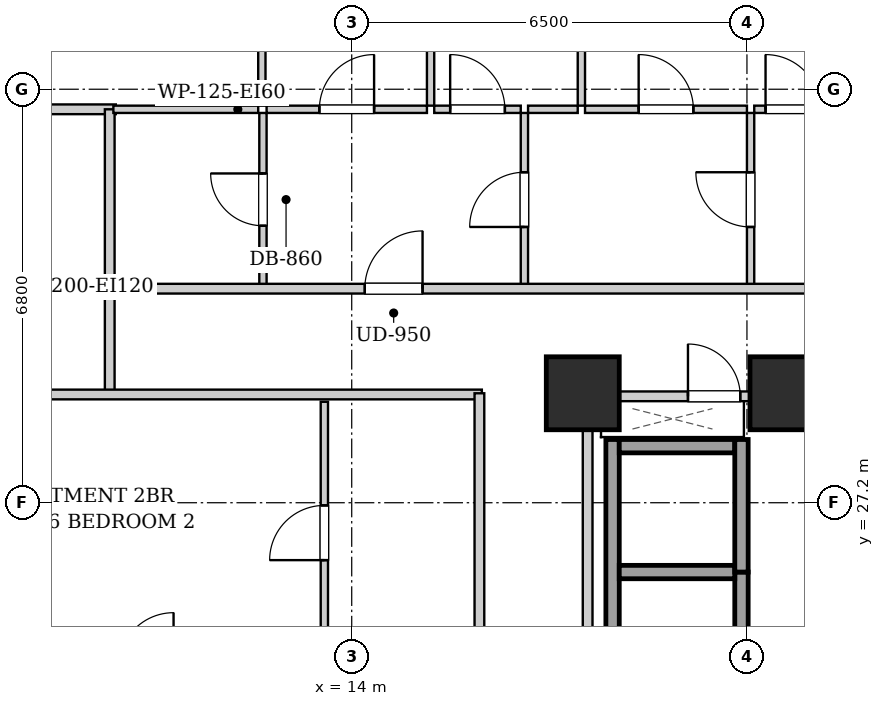
"""IFC4 building model, lengths in metres.
Left out: names, types, materials, properties, quantities, classifications, styles, units other than length and angle.
Written with IfcOpenShell. Run it as: python <this file> out.ifc"""

import sys

from ifc_helpers import new_model, si_unit, direction, frame, frame_2d, origin, origin_2d, place, context, subcontext, project, spatial, rectangle, extrude, element, fill, save


model = new_model("IFC4")
c1 = context("Model", 3, precision=1e-05, world=origin(), true_north=direction((0.0, 1.0)))
c2 = subcontext(c1, "Body", "Model", "MODEL_VIEW")
j1 = project(units=[si_unit("LENGTHUNIT", "METRE"), si_unit("PLANEANGLEUNIT", "RADIAN")], contexts=[c1])
p1 = place(None, origin())
s1 = spatial("IfcSite", under=j1, at=p1, CompositionType="ELEMENT")
p2 = place(p1, origin())
s2 = spatial("IfcBuilding", under=s1, at=p2, CompositionType="ELEMENT")
p3 = place(p2, frame((0.0, 0.0, 48.2)))
s3 = spatial("IfcBuildingStorey", under=s2, at=p3, CompositionType="ELEMENT", Elevation=48.2)
for number, where, z_axis, x_axis in (
    (1, (17.8, 29.0, 0.0), (0.0, 0.0, 1.0), (1.0, 0.0, 0.0)),
    (2, (21.15, 29.0, 0.0), (0.0, 0.0, 1.0), (1.0, 0.0, 0.0)),
):
    element("IfcColumn", number, at=place(p3, frame(where, z_axis=z_axis, x_axis=x_axis)), inside=s3, PredefinedType="COLUMN", context=c2, shape_type="SweptSolid", body=[
        extrude(rectangle(XDim=1.2, YDim=1.2, at=origin_2d()), origin(), (0.0, 0.0, 1.0), 3.2),
    ])
p4 = place(p3, frame((18.29, 24.1, 0.0), z_axis=(0.0, 0.0, 1.0), x_axis=(0.0, 1.0, 0.0)))
e3 = element("IfcWall", 3, at=p4, inside=s3, PredefinedType="SHEAR", context=c2, shape_type="SweptSolid", body=[
    extrude(rectangle(XDim=4.14, YDim=0.22, at=frame_2d((2.07, 0.0))), origin(), (0.0, 0.0, 1.0), 2.94),
])
p5 = place(p3, frame((20.41, 24.1, 0.0), z_axis=(0.0, 0.0, 1.0), x_axis=(0.0, 1.0, 0.0)))
e4 = element("IfcWall", 4, at=p5, inside=s3, PredefinedType="SHEAR", context=c2, shape_type="SweptSolid", body=[
    extrude(rectangle(XDim=1.96, YDim=0.22, at=frame_2d((0.98, 0.0))), origin(), (0.0, 0.0, 1.0), 2.94),
])
for number, where, z_axis, x_axis in (
    (5, (18.4, 26.06, 0.0), (0.0, 0.0, 1.0), (1.0, 0.0, 0.0)),
    (6, (18.4, 28.13, 0.0), (0.0, 0.0, 1.0), (1.0, 0.0, 0.0)),
):
    element("IfcWall", number, at=place(p3, frame(where, z_axis=z_axis, x_axis=x_axis)), inside=s3, PredefinedType="SHEAR", context=c2, shape_type="SweptSolid", body=[
        extrude(rectangle(XDim=1.9, YDim=0.22, at=frame_2d((0.95, 0.0))), origin(), (0.0, 0.0, 1.0), 2.94),
    ])
p6 = place(p3, frame((20.41, 26.06, 0.0), z_axis=(0.0, 0.0, 1.0), x_axis=(0.0, 1.0, 0.0)))
e7 = element("IfcWall", 7, at=p6, inside=s3, PredefinedType="SHEAR", context=c2, shape_type="SweptSolid", body=[
    extrude(rectangle(XDim=2.18, YDim=0.22, at=frame_2d((1.09, 0.0))), origin(), (0.0, 0.0, 1.0), 2.94),
])
p7 = place(p3, frame((17.88, 24.12, 0.0), z_axis=(0.0, 0.0, 1.0), x_axis=(0.0, 1.0, 0.0)))
e8 = element("IfcWall", 8, at=p7, inside=s3, PredefinedType="PARTITIONING", context=c2, shape_type="SweptSolid", body=[
    extrude(rectangle(XDim=4.76, YDim=0.16, at=frame_2d((2.38, 0.0))), origin(), (0.0, 0.0, 1.0), 2.275),
])
p8 = place(p3, frame((17.96, 28.95, 0.0), z_axis=(0.0, 0.0, 1.0), x_axis=(1.0, 0.0, 0.0)))
e9 = element("IfcWall", 9, at=p8, inside=s3, PredefinedType="PARTITIONING", context=c2, shape_type="SweptSolid", body=[
    extrude(rectangle(XDim=4.29, YDim=0.16, at=frame_2d((2.145, 0.0))), origin(), (0.0, 0.0, 1.0), 2.232),
])
p9 = place(p8, frame((1.57, 0.0, 0.0)))
e10 = element("IfcOpeningElement", 10, at=p9, cuts=e9, PredefinedType="OPENING", context=c2, shape_type="SweptSolid", body=[
    extrude(rectangle(XDim=0.86, YDim=2.05, at=frame_2d((0.43, 1.025))), frame((0.0, 0.09, 0.0), z_axis=(0.0, -1.0, 0.0), x_axis=(1.0, 0.0, 0.0)), (0.0, 0.0, 1.0), 0.18),
])
p10 = place(p3, frame((10.02, 28.98, 0.0), z_axis=(0.0, 0.0, 1.0), x_axis=(0.0, 1.0, 0.0)))
e11 = element("IfcWall", 11, at=p10, inside=s3, PredefinedType="PARTITIONING", context=c2, shape_type="SweptSolid", body=[
    extrude(rectangle(XDim=1.74, YDim=0.16, at=frame_2d((0.87, 0.0))), origin(), (0.0, 0.0, 1.0), 2.94),
])
p11 = place(p3, frame((7.78, 28.98, 0.0), z_axis=(0.0, 0.0, 1.0), x_axis=(1.0, 0.0, 0.0)))
e12 = element("IfcWall", 12, at=p11, inside=s3, PredefinedType="PARTITIONING", context=c2, shape_type="SweptSolid", body=[
    extrude(rectangle(XDim=8.36, YDim=0.16, at=frame_2d((4.18, 0.0))), origin(), (0.0, 0.0, 1.0), 2.232),
])
p12 = place(p3, frame((7.78, 33.67, 0.0), z_axis=(0.0, 0.0, 1.0), x_axis=(1.0, 0.0, 0.0)))
e13 = element("IfcWall", 13, at=p12, inside=s3, PredefinedType="PARTITIONING", context=c2, shape_type="SweptSolid", body=[
    extrude(rectangle(XDim=2.34, YDim=0.16, at=frame_2d((1.17, 0.0))), origin(), (0.0, 0.0, 1.0), 2.94),
])
p13 = place(p3, frame((10.02, 30.76, 0.0), z_axis=(0.0, 0.0, 1.0), x_axis=(0.0, 1.0, 0.0)))
e14 = element("IfcWall", 14, at=p13, inside=s3, PredefinedType="PARTITIONING", context=c2, shape_type="SweptSolid", body=[
    extrude(rectangle(XDim=2.91, YDim=0.16, at=frame_2d((1.455, 0.0))), origin(), (0.0, 0.0, 1.0), 2.94),
])
p14 = place(p3, frame((12.54, 30.76, 0.0), z_axis=(0.0, 0.0, 1.0), x_axis=(0.0, 1.0, 0.0)))
e15 = element("IfcWall", 15, at=p14, inside=s3, PredefinedType="PARTITIONING", context=c2, shape_type="SweptSolid", body=[
    extrude(rectangle(XDim=2.85, YDim=0.12, at=frame_2d((1.425, 0.0))), origin(), (0.0, 0.0, 1.0), 2.94),
])
p15 = place(p14, frame((0.995, 0.0, 0.0)))
e16 = element("IfcOpeningElement", 16, at=p15, cuts=e15, PredefinedType="OPENING", context=c2, shape_type="SweptSolid", body=[
    extrude(rectangle(XDim=0.86, YDim=2.05, at=frame_2d((0.43, 1.025))), frame((0.0, 0.07, 0.0), z_axis=(0.0, -1.0, 0.0), x_axis=(1.0, 0.0, 0.0)), (0.0, 0.0, 1.0), 0.14),
])
p16 = place(p3, frame((10.08, 33.67, 0.0), z_axis=(0.0, 0.0, 1.0), x_axis=(1.0, 0.0, 0.0)))
e17 = element("IfcWall", 17, at=p16, inside=s3, PredefinedType="PARTITIONING", context=c2, shape_type="SweptSolid", body=[
    extrude(rectangle(XDim=2.382, YDim=0.12, at=frame_2d((1.191, 0.0))), origin(), (0.0, 0.0, 1.0), 2.94),
])
p17 = place(p3, frame((16.84, 30.76, 0.0), z_axis=(0.0, 0.0, 1.0), x_axis=(0.0, 1.0, 0.0)))
e18 = element("IfcWall", 18, at=p17, inside=s3, PredefinedType="PARTITIONING", context=c2, shape_type="SweptSolid", body=[
    extrude(rectangle(XDim=2.85, YDim=0.12, at=frame_2d((1.425, 0.0))), origin(), (0.0, 0.0, 1.0), 2.94),
])
p18 = place(p17, frame((0.975, 0.0, 0.0)))
e19 = element("IfcOpeningElement", 19, at=p18, cuts=e18, PredefinedType="OPENING", context=c2, shape_type="SweptSolid", body=[
    extrude(rectangle(XDim=0.9, YDim=2.05, at=frame_2d((0.45, 1.025))), frame((0.0, 0.07, 0.0), z_axis=(0.0, -1.0, 0.0), x_axis=(1.0, 0.0, 0.0)), (0.0, 0.0, 1.0), 0.14),
])
p19 = place(p3, frame((12.6, 33.67, 0.0), z_axis=(0.0, 0.0, 1.0), x_axis=(1.0, 0.0, 0.0)))
e20 = element("IfcWall", 20, at=p19, inside=s3, PredefinedType="PARTITIONING", context=c2, shape_type="SweptSolid", body=[
    extrude(rectangle(XDim=2.637, YDim=0.12, at=frame_2d((1.318, 0.0))), origin(), (0.0, 0.0, 1.0), 2.94),
])
p20 = place(p19, frame((0.868, 0.0, 0.0)))
e21 = element("IfcOpeningElement", 21, at=p20, cuts=e20, PredefinedType="OPENING", context=c2, shape_type="SweptSolid", body=[
    extrude(rectangle(XDim=0.9, YDim=2.05, at=frame_2d((0.45, 1.025))), frame((0.0, 0.07, 0.0), z_axis=(0.0, -1.0, 0.0), x_axis=(1.0, 0.0, 0.0)), (0.0, 0.0, 1.0), 0.14),
])
p21 = place(p3, frame((15.357, 33.67, 0.0), z_axis=(0.0, 0.0, 1.0), x_axis=(1.0, 0.0, 0.0)))
e22 = element("IfcWall", 22, at=p21, inside=s3, PredefinedType="PARTITIONING", context=c2, shape_type="SweptSolid", body=[
    extrude(rectangle(XDim=1.423, YDim=0.12, at=frame_2d((0.711, 0.0))), origin(), (0.0, 0.0, 1.0), 2.94),
])
p22 = place(p21, frame((0.262, 0.0, 0.0)))
e23 = element("IfcOpeningElement", 23, at=p22, cuts=e22, PredefinedType="OPENING", context=c2, shape_type="SweptSolid", body=[
    extrude(rectangle(XDim=0.9, YDim=2.05, at=frame_2d((0.45, 1.025))), frame((0.0, 0.07, 0.0), z_axis=(0.0, -1.0, 0.0), x_axis=(1.0, 0.0, 0.0)), (0.0, 0.0, 1.0), 0.14),
])
p23 = place(p3, frame((20.56, 30.76, 0.0), z_axis=(0.0, 0.0, 1.0), x_axis=(0.0, 1.0, 0.0)))
e24 = element("IfcWall", 24, at=p23, inside=s3, PredefinedType="PARTITIONING", context=c2, shape_type="SweptSolid", body=[
    extrude(rectangle(XDim=2.85, YDim=0.12, at=frame_2d((1.425, 0.0))), origin(), (0.0, 0.0, 1.0), 2.94),
])
p24 = place(p23, frame((0.975, 0.0, 0.0)))
e25 = element("IfcOpeningElement", 25, at=p24, cuts=e24, PredefinedType="OPENING", context=c2, shape_type="SweptSolid", body=[
    extrude(rectangle(XDim=0.9, YDim=2.05, at=frame_2d((0.45, 1.025))), frame((0.0, 0.07, 0.0), z_axis=(0.0, -1.0, 0.0), x_axis=(1.0, 0.0, 0.0)), (0.0, 0.0, 1.0), 0.14),
])
p25 = place(p3, frame((16.9, 33.67, 0.0), z_axis=(0.0, 0.0, 1.0), x_axis=(1.0, 0.0, 0.0)))
e26 = element("IfcWall", 26, at=p25, inside=s3, PredefinedType="PARTITIONING", context=c2, shape_type="SweptSolid", body=[
    extrude(rectangle(XDim=0.817, YDim=0.12, at=frame_2d((0.409, 0.0))), origin(), (0.0, 0.0, 1.0), 2.94),
])
p26 = place(p3, frame((17.837, 33.67, 0.0), z_axis=(0.0, 0.0, 1.0), x_axis=(1.0, 0.0, 0.0)))
e27 = element("IfcWall", 27, at=p26, inside=s3, PredefinedType="PARTITIONING", context=c2, shape_type="SweptSolid", body=[
    extrude(rectangle(XDim=2.663, YDim=0.12, at=frame_2d((1.332, 0.0))), origin(), (0.0, 0.0, 1.0), 2.94),
])
p27 = place(p26, frame((0.882, 0.0, 0.0)))
e28 = element("IfcOpeningElement", 28, at=p27, cuts=e27, PredefinedType="OPENING", context=c2, shape_type="SweptSolid", body=[
    extrude(rectangle(XDim=0.9, YDim=2.05, at=frame_2d((0.45, 1.025))), frame((0.0, 0.07, 0.0), z_axis=(0.0, -1.0, 0.0), x_axis=(1.0, 0.0, 0.0)), (0.0, 0.0, 1.0), 0.14),
])
p28 = place(p3, frame((20.62, 33.67, 0.0), z_axis=(0.0, 0.0, 1.0), x_axis=(1.0, 0.0, 0.0)))
e29 = element("IfcWall", 29, at=p28, inside=s3, PredefinedType="PARTITIONING", context=c2, shape_type="SweptSolid", body=[
    extrude(rectangle(XDim=1.273, YDim=0.12, at=frame_2d((0.636, 0.0))), origin(), (0.0, 0.0, 1.0), 2.94),
])
p29 = place(p28, frame((0.186, 0.0, 0.0)))
e30 = element("IfcOpeningElement", 30, at=p29, cuts=e29, PredefinedType="OPENING", context=c2, shape_type="SweptSolid", body=[
    extrude(rectangle(XDim=0.9, YDim=2.05, at=frame_2d((0.45, 1.025))), frame((0.0, 0.07, 0.0), z_axis=(0.0, -1.0, 0.0), x_axis=(1.0, 0.0, 0.0)), (0.0, 0.0, 1.0), 0.14),
])
p30 = place(p3, frame((12.522, 33.73, 0.0), z_axis=(0.0, 0.0, 1.0), x_axis=(0.0, 1.0, 0.0)))
e31 = element("IfcWall", 31, at=p30, inside=s3, PredefinedType="PARTITIONING", context=c2, shape_type="SweptSolid", body=[
    extrude(rectangle(XDim=13.59, YDim=0.12, at=frame_2d((6.795, 0.0))), origin(), (0.0, 0.0, 1.0), 2.94),
])
p31 = place(p30, frame((6.33, 0.0, 0.0)))
e32 = element("IfcOpeningElement", 32, at=p31, cuts=e31, PredefinedType="OPENING", context=c2, shape_type="SweptSolid", body=[
    extrude(rectangle(XDim=0.9, YDim=2.05, at=frame_2d((0.45, 1.025))), frame((0.0, 0.07, 0.0), z_axis=(0.0, -1.0, 0.0), x_axis=(1.0, 0.0, 0.0)), (0.0, 0.0, 1.0), 0.14),
])
p32 = place(p3, frame((15.297, 33.73, 0.0), z_axis=(0.0, 0.0, 1.0), x_axis=(0.0, 1.0, 0.0)))
e33 = element("IfcWall", 33, at=p32, inside=s3, PredefinedType="PARTITIONING", context=c2, shape_type="SweptSolid", body=[
    extrude(rectangle(XDim=13.59, YDim=0.12, at=frame_2d((6.795, 0.0))), origin(), (0.0, 0.0, 1.0), 2.94),
])
p33 = place(p32, frame((6.33, 0.0, 0.0)))
e34 = element("IfcOpeningElement", 34, at=p33, cuts=e33, PredefinedType="OPENING", context=c2, shape_type="SweptSolid", body=[
    extrude(rectangle(XDim=0.9, YDim=2.05, at=frame_2d((0.45, 1.025))), frame((0.0, 0.07, 0.0), z_axis=(0.0, -1.0, 0.0), x_axis=(1.0, 0.0, 0.0)), (0.0, 0.0, 1.0), 0.14),
])
p34 = place(p3, frame((17.777, 33.73, 0.0), z_axis=(0.0, 0.0, 1.0), x_axis=(0.0, 1.0, 0.0)))
e35 = element("IfcWall", 35, at=p34, inside=s3, PredefinedType="PARTITIONING", context=c2, shape_type="SweptSolid", body=[
    extrude(rectangle(XDim=13.59, YDim=0.12, at=frame_2d((6.795, 0.0))), origin(), (0.0, 0.0, 1.0), 2.232),
])
p35 = place(p34, frame((6.33, 0.0, 0.0)))
e36 = element("IfcOpeningElement", 36, at=p35, cuts=e35, PredefinedType="OPENING", context=c2, shape_type="SweptSolid", body=[
    extrude(rectangle(XDim=0.9, YDim=2.05, at=frame_2d((0.45, 1.025))), frame((0.0, 0.07, 0.0), z_axis=(0.0, -1.0, 0.0), x_axis=(1.0, 0.0, 0.0)), (0.0, 0.0, 1.0), 0.14),
])
p36 = place(p3, frame((13.55, 24.552, 0.0), z_axis=(0.0, 0.0, 1.0), x_axis=(0.0, 1.0, 0.0)))
e37 = element("IfcWall", 37, at=p36, inside=s3, PredefinedType="PARTITIONING", context=c2, shape_type="SweptSolid", body=[
    extrude(rectangle(XDim=4.308, YDim=0.12, at=frame_2d((2.154, 0.0))), origin(), (0.0, 0.0, 1.0), 2.94),
])
p37 = place(p36, frame((1.704, 0.0, 0.0)))
e38 = element("IfcOpeningElement", 38, at=p37, cuts=e37, PredefinedType="OPENING", context=c2, shape_type="SweptSolid", body=[
    extrude(rectangle(XDim=0.9, YDim=2.05, at=frame_2d((0.45, 1.025))), frame((0.0, 0.07, 0.0), z_axis=(0.0, -1.0, 0.0), x_axis=(1.0, 0.0, 0.0)), (0.0, 0.0, 1.0), 0.14),
])
p38 = place(p3, frame((10.05, 30.72, 0.0), z_axis=(0.0, 0.0, 1.0), x_axis=(1.0, 0.0, 0.0)))
e39 = element("IfcWall", 39, at=p38, inside=s3, PredefinedType="PARTITIONING", context=c2, shape_type="SweptSolid", body=[
    extrude(rectangle(XDim=33.9, YDim=0.16, at=frame_2d((16.95, 0.0))), origin(), (0.0, 0.0, 1.0), 2.94),
])
p39 = place(p38, frame((4.165, 0.0, 0.0)))
e40 = element("IfcOpeningElement", 40, at=p39, cuts=e39, PredefinedType="OPENING", context=c2, shape_type="SweptSolid", body=[
    extrude(rectangle(XDim=0.95, YDim=2.1, at=frame_2d((0.475, 1.05))), frame((0.0, 0.09, 0.0), z_axis=(0.0, -1.0, 0.0), x_axis=(1.0, 0.0, 0.0)), (0.0, 0.0, 1.0), 0.18),
])
p40 = place(p38, frame((27.495, 0.0, 0.0)))
e41 = element("IfcOpeningElement", 41, at=p40, cuts=e39, PredefinedType="OPENING", context=c2, shape_type="SweptSolid", body=[
    extrude(rectangle(XDim=0.95, YDim=2.1, at=frame_2d((0.475, 1.05))), frame((0.0, 0.09, 0.0), z_axis=(0.0, -1.0, 0.0), x_axis=(1.0, 0.0, 0.0)), (0.0, 0.0, 1.0), 0.18),
])
p41 = place(p3, frame((16.1, 15.07, 0.0), z_axis=(0.0, 0.0, 1.0), x_axis=(0.0, 1.0, 0.0)))
e42 = element("IfcWall", 42, at=p41, inside=s3, PredefinedType="PARTITIONING", context=c2, shape_type="SweptSolid", body=[
    extrude(rectangle(XDim=13.93, YDim=0.16, at=frame_2d((6.965, 0.0))), origin(), (0.0, 0.0, 1.0), 2.94),
])
p42 = place(p41, frame((4.385, 0.0, 0.0)))
e43 = element("IfcOpeningElement", 43, at=p42, cuts=e42, PredefinedType="OPENING", context=c2, shape_type="SweptSolid", body=[
    extrude(rectangle(XDim=0.95, YDim=2.1, at=frame_2d((0.475, 1.05))), frame((0.0, 0.09, 0.0), z_axis=(0.0, -1.0, 0.0), x_axis=(1.0, 0.0, 0.0)), (0.0, 0.0, 1.0), 0.18),
])
p43 = place(p9, origin())
e44 = element("IfcDoor", 44, at=p43, inside=s3, OperationType="SINGLE_SWING_LEFT", PredefinedType="DOOR", context=c2, shape_type="SweptSolid", body=[
    extrude(rectangle(XDim=0.86, YDim=2.05, at=frame_2d((0.43, 1.025))), frame((0.0, 0.025, 0.0), z_axis=(0.0, -1.0, 0.0), x_axis=(1.0, 0.0, 0.0)), (0.0, 0.0, 1.0), 0.05),
])
fill(e10, e44)
p44 = place(p15, origin())
e45 = element("IfcDoor", 45, at=p44, inside=s3, OperationType="SINGLE_SWING_RIGHT", PredefinedType="DOOR", context=c2, shape_type="SweptSolid", body=[
    extrude(rectangle(XDim=0.86, YDim=2.05, at=frame_2d((0.43, 1.025))), frame((0.0, 0.025, 0.0), z_axis=(0.0, -1.0, 0.0), x_axis=(1.0, 0.0, 0.0)), (0.0, 0.0, 1.0), 0.05),
])
fill(e16, e45)
p45 = place(p18, origin())
e46 = element("IfcDoor", 46, at=p45, inside=s3, OperationType="SINGLE_SWING_LEFT", PredefinedType="DOOR", context=c2, shape_type="SweptSolid", body=[
    extrude(rectangle(XDim=0.9, YDim=2.05, at=frame_2d((0.45, 1.025))), frame((0.0, 0.025, 0.0), z_axis=(0.0, -1.0, 0.0), x_axis=(1.0, 0.0, 0.0)), (0.0, 0.0, 1.0), 0.05),
])
fill(e19, e46)
p46 = place(p20, origin())
e47 = element("IfcDoor", 47, at=p46, inside=s3, OperationType="SINGLE_SWING_RIGHT", PredefinedType="DOOR", context=c2, shape_type="SweptSolid", body=[
    extrude(rectangle(XDim=0.9, YDim=2.05, at=frame_2d((0.45, 1.025))), frame((0.0, 0.025, 0.0), z_axis=(0.0, -1.0, 0.0), x_axis=(1.0, 0.0, 0.0)), (0.0, 0.0, 1.0), 0.05),
])
fill(e21, e47)
p47 = place(p22, origin())
e48 = element("IfcDoor", 48, at=p47, inside=s3, OperationType="SINGLE_SWING_LEFT", PredefinedType="DOOR", context=c2, shape_type="SweptSolid", body=[
    extrude(rectangle(XDim=0.9, YDim=2.05, at=frame_2d((0.45, 1.025))), frame((0.0, 0.025, 0.0), z_axis=(0.0, -1.0, 0.0), x_axis=(1.0, 0.0, 0.0)), (0.0, 0.0, 1.0), 0.05),
])
fill(e23, e48)
p48 = place(p24, origin())
e49 = element("IfcDoor", 49, at=p48, inside=s3, OperationType="SINGLE_SWING_RIGHT", PredefinedType="DOOR", context=c2, shape_type="SweptSolid", body=[
    extrude(rectangle(XDim=0.9, YDim=2.05, at=frame_2d((0.45, 1.025))), frame((0.0, 0.025, 0.0), z_axis=(0.0, -1.0, 0.0), x_axis=(1.0, 0.0, 0.0)), (0.0, 0.0, 1.0), 0.05),
])
fill(e25, e49)
p49 = place(p27, origin())
e50 = element("IfcDoor", 50, at=p49, inside=s3, OperationType="SINGLE_SWING_LEFT", PredefinedType="DOOR", context=c2, shape_type="SweptSolid", body=[
    extrude(rectangle(XDim=0.9, YDim=2.05, at=frame_2d((0.45, 1.025))), frame((0.0, 0.025, 0.0), z_axis=(0.0, -1.0, 0.0), x_axis=(1.0, 0.0, 0.0)), (0.0, 0.0, 1.0), 0.05),
])
fill(e28, e50)
p50 = place(p29, origin())
e51 = element("IfcDoor", 51, at=p50, inside=s3, OperationType="SINGLE_SWING_LEFT", PredefinedType="DOOR", context=c2, shape_type="SweptSolid", body=[
    extrude(rectangle(XDim=0.9, YDim=2.05, at=frame_2d((0.45, 1.025))), frame((0.0, 0.025, 0.0), z_axis=(0.0, -1.0, 0.0), x_axis=(1.0, 0.0, 0.0)), (0.0, 0.0, 1.0), 0.05),
])
fill(e30, e51)
p51 = place(p37, origin())
e52 = element("IfcDoor", 52, at=p51, inside=s3, OperationType="SINGLE_SWING_LEFT", PredefinedType="DOOR", context=c2, shape_type="SweptSolid", body=[
    extrude(rectangle(XDim=0.9, YDim=2.05, at=frame_2d((0.45, 1.025))), frame((0.0, 0.025, 0.0), z_axis=(0.0, -1.0, 0.0), x_axis=(1.0, 0.0, 0.0)), (0.0, 0.0, 1.0), 0.05),
])
fill(e38, e52)
p52 = place(p39, origin())
e53 = element("IfcDoor", 53, at=p52, inside=s3, OperationType="SINGLE_SWING_RIGHT", PredefinedType="DOOR", context=c2, shape_type="SweptSolid", body=[
    extrude(rectangle(XDim=0.95, YDim=2.1, at=frame_2d((0.475, 1.05))), frame((0.0, 0.025, 0.0), z_axis=(0.0, -1.0, 0.0), x_axis=(1.0, 0.0, 0.0)), (0.0, 0.0, 1.0), 0.05),
])
fill(e40, e53)
save(model, sys.argv[1])
